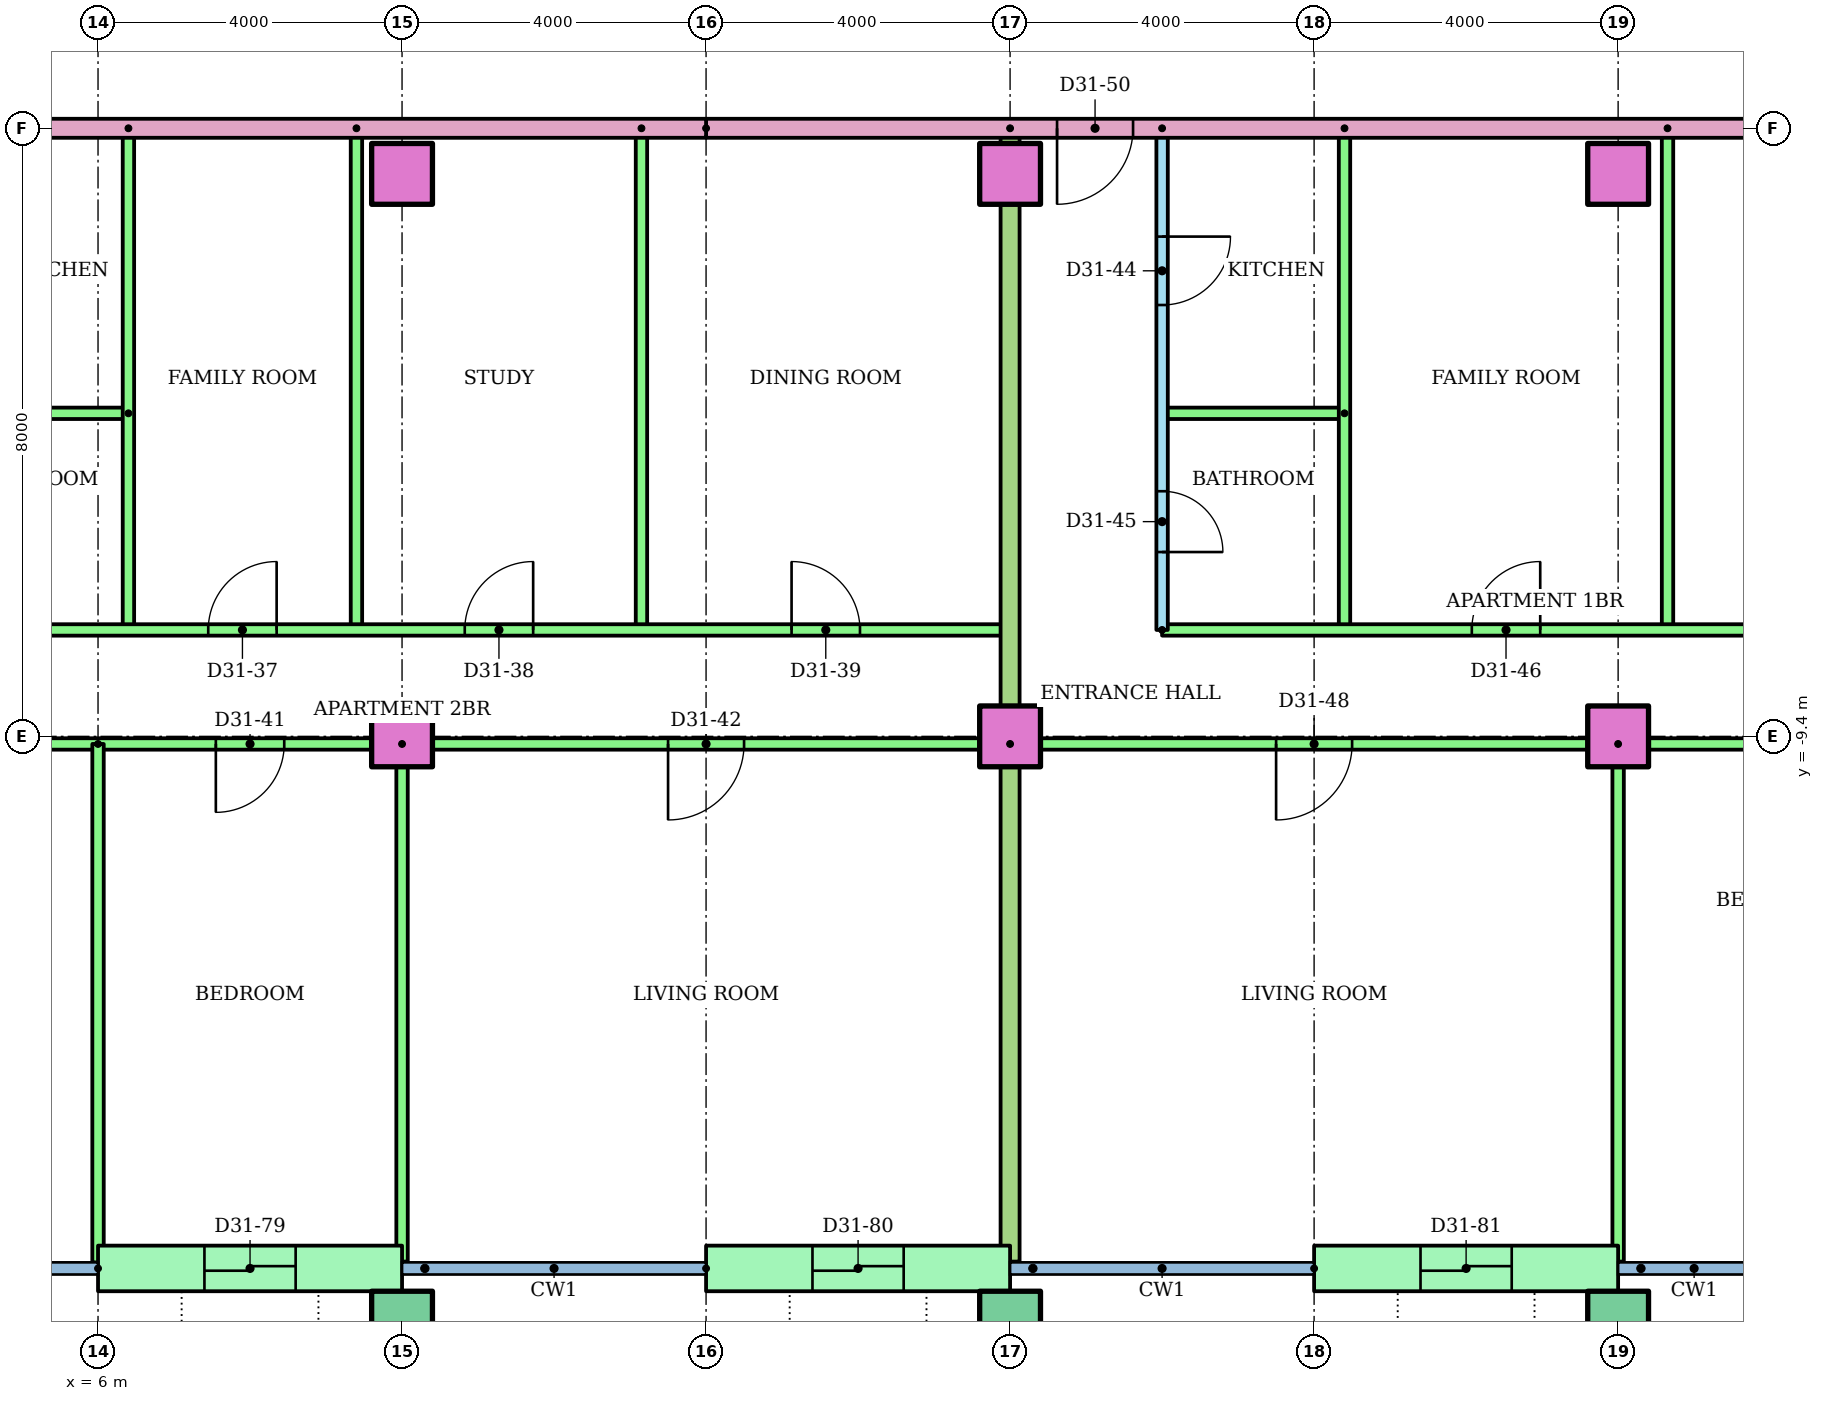
"""IFC4 building model, lengths in metres.
Left out: names, types, materials, properties, quantities, classifications, styles, units other than length and angle.
Written with IfcOpenShell. Run it as: python <this file> out.ifc"""

import sys

from ifc_helpers import new_model, si_unit, direction, frame, frame_2d, origin, origin_2d, place, context, subcontext, project, spatial, rectangle, hollow_rectangle, extrude, element, fill, save


model = new_model("IFC4")
c1 = context("Model", 3, precision=1e-05, world=origin(), true_north=direction((0.0, 1.0)))
c2 = subcontext(c1, "Body", "Model", "MODEL_VIEW")
j1 = project(units=[si_unit("LENGTHUNIT", "METRE"), si_unit("PLANEANGLEUNIT", "RADIAN")], contexts=[c1])
p1 = place(None, origin())
s1 = spatial("IfcSite", under=j1, at=p1, CompositionType="ELEMENT")
p2 = place(p1, origin())
s2 = spatial("IfcBuilding", under=s1, at=p2, CompositionType="ELEMENT")
p3 = place(p2, frame((0.0, 0.0, 123.0)))
s3 = spatial("IfcBuildingStorey", under=s2, at=p3, CompositionType="ELEMENT", Elevation=123.0)
for number, where in (
    (1, (10.0, -17.1, 0.0)),
    (2, (18.0, -17.1, 0.0)),
    (3, (26.0, -17.1, 0.0)),
):
    element("IfcColumn", number, at=place(p3, frame(where)), inside=s3, PredefinedType="COLUMN", context=c2, shape_type="SweptSolid", body=[
        extrude(hollow_rectangle(XDim=0.8, YDim=0.8, WallThickness=0.04, at=origin_2d()), origin(), (0.0, 0.0, 1.0), 3.2),
    ])
for number, where in (
    (4, (10.0, -9.4, 0.0)),
    (5, (18.0, -9.4, 0.0)),
    (6, (26.0, -9.4, 0.0)),
    (7, (10.0, -2.0, 0.0)),
    (8, (18.0, -2.0, 0.0)),
    (9, (26.0, -2.0, 0.0)),
):
    element("IfcColumn", number, at=place(p3, frame(where)), inside=s3, PredefinedType="COLUMN", context=c2, shape_type="SweptSolid", body=[
        extrude(rectangle(XDim=0.8, YDim=0.8, at=origin_2d()), origin(), (0.0, 0.0, 1.0), 3.2),
    ])
p4 = place(p3, frame((6.0, -16.4, 0.0)))
e10 = element("IfcWall", 10, at=p4, inside=s3, PredefinedType="STANDARD", context=c2, shape_type="SweptSolid", body=[
    extrude(rectangle(XDim=4.0, YDim=0.6, at=frame_2d((2.0, 0.0))), origin(), (0.0, 0.0, 1.0), 2.92),
])
p5 = place(p4, frame((1.4, 0.0, 0.0)))
e11 = element("IfcOpeningElement", 11, at=p5, cuts=e10, PredefinedType="OPENING", context=c2, shape_type="SweptSolid", body=[
    extrude(rectangle(XDim=1.2, YDim=2.1, at=frame_2d((0.6, 1.05))), frame((0.0, 0.31, 0.0), z_axis=(0.0, -1.0, 0.0), x_axis=(1.0, 0.0, 0.0)), (0.0, 0.0, 1.0), 0.62),
])
p6 = place(p3, frame((14.0, -16.4, 0.0)))
e12 = element("IfcWall", 12, at=p6, inside=s3, PredefinedType="STANDARD", context=c2, shape_type="SweptSolid", body=[
    extrude(rectangle(XDim=4.0, YDim=0.6, at=frame_2d((2.0, 0.0))), origin(), (0.0, 0.0, 1.0), 2.92),
])
p7 = place(p6, frame((1.4, 0.0, 0.0)))
e13 = element("IfcOpeningElement", 13, at=p7, cuts=e12, PredefinedType="OPENING", context=c2, shape_type="SweptSolid", body=[
    extrude(rectangle(XDim=1.2, YDim=2.1, at=frame_2d((0.6, 1.05))), frame((0.0, 0.31, 0.0), z_axis=(0.0, -1.0, 0.0), x_axis=(1.0, 0.0, 0.0)), (0.0, 0.0, 1.0), 0.62),
])
p8 = place(p3, frame((22.0, -16.4, 0.0)))
e14 = element("IfcWall", 14, at=p8, inside=s3, PredefinedType="STANDARD", context=c2, shape_type="SweptSolid", body=[
    extrude(rectangle(XDim=4.0, YDim=0.6, at=frame_2d((2.0, 0.0))), origin(), (0.0, 0.0, 1.0), 2.92),
])
p9 = place(p8, frame((1.4, 0.0, 0.0)))
e15 = element("IfcOpeningElement", 15, at=p9, cuts=e14, PredefinedType="OPENING", context=c2, shape_type="SweptSolid", body=[
    extrude(rectangle(XDim=1.2, YDim=2.1, at=frame_2d((0.6, 1.05))), frame((0.0, 0.31, 0.0), z_axis=(0.0, -1.0, 0.0), x_axis=(1.0, 0.0, 0.0)), (0.0, 0.0, 1.0), 0.62),
])
p10 = place(p3, frame((6.4, -5.15, 0.0), z_axis=(0.0, 0.0, 1.0), x_axis=(-1.0, 0.0, 0.0)))
e16 = element("IfcWall", 16, at=p10, inside=s3, PredefinedType="PARTITIONING", context=c2, shape_type="SweptSolid", body=[
    extrude(rectangle(XDim=2.4, YDim=0.15, at=frame_2d((1.2, 0.0))), origin(), (0.0, 0.0, 1.0), 2.4),
])
for number, where, z_axis, x_axis in (
    (17, (6.4, -1.4, 0.0), (0.0, 0.0, 1.0), (0.0, -1.0, 0.0)),
    (18, (9.4, -1.4, 0.0), (0.0, 0.0, 1.0), (0.0, -1.0, 0.0)),
    (19, (13.15, -1.4, 0.0), (0.0, 0.0, 1.0), (0.0, -1.0, 0.0)),
):
    element("IfcWall", number, at=place(p3, frame(where, z_axis=z_axis, x_axis=x_axis)), inside=s3, PredefinedType="PARTITIONING", context=c2, shape_type="SweptSolid", body=[
        extrude(rectangle(XDim=6.6, YDim=0.15, at=frame_2d((3.3, 0.0))), origin(), (0.0, 0.0, 1.0), 2.4),
    ])
p11 = place(p3, frame((4.0, -8.0, 0.0)))
e20 = element("IfcWall", 20, at=p11, inside=s3, PredefinedType="PARTITIONING", context=c2, shape_type="SweptSolid", body=[
    extrude(rectangle(XDim=14.0, YDim=0.15, at=frame_2d((7.0, 0.0))), origin(), (0.0, 0.0, 1.0), 2.4),
])
p12 = place(p11, frame((3.45, 0.0, 0.0)))
e21 = element("IfcOpeningElement", 21, at=p12, cuts=e20, PredefinedType="OPENING", context=c2, shape_type="SweptSolid", body=[
    extrude(rectangle(XDim=0.9, YDim=2.1, at=frame_2d((0.45, 1.05))), frame((0.0, 0.085, 0.0), z_axis=(0.0, -1.0, 0.0), x_axis=(1.0, 0.0, 0.0)), (0.0, 0.0, 1.0), 0.17),
])
p13 = place(p11, frame((6.825, 0.0, 0.0)))
e22 = element("IfcOpeningElement", 22, at=p13, cuts=e20, PredefinedType="OPENING", context=c2, shape_type="SweptSolid", body=[
    extrude(rectangle(XDim=0.9, YDim=2.1, at=frame_2d((0.45, 1.05))), frame((0.0, 0.085, 0.0), z_axis=(0.0, -1.0, 0.0), x_axis=(1.0, 0.0, 0.0)), (0.0, 0.0, 1.0), 0.17),
])
p14 = place(p11, frame((11.125, 0.0, 0.0)))
e23 = element("IfcOpeningElement", 23, at=p14, cuts=e20, PredefinedType="OPENING", context=c2, shape_type="SweptSolid", body=[
    extrude(rectangle(XDim=0.9, YDim=2.1, at=frame_2d((0.45, 1.05))), frame((0.0, 0.085, 0.0), z_axis=(0.0, -1.0, 0.0), x_axis=(1.0, 0.0, 0.0)), (0.0, 0.0, 1.0), 0.17),
])
p15 = place(p3, frame((18.0, -9.5, 0.0), z_axis=(0.0, 0.0, 1.0), x_axis=(-1.0, 0.0, 0.0)))
e24 = element("IfcWall", 24, at=p15, inside=s3, PredefinedType="PARTITIONING", context=c2, shape_type="SweptSolid", body=[
    extrude(rectangle(XDim=16.0, YDim=0.15, at=frame_2d((8.0, 0.0))), origin(), (0.0, 0.0, 1.0), 2.4),
])
p16 = place(p15, frame((13.55, 0.0, 0.0)))
e25 = element("IfcOpeningElement", 25, at=p16, cuts=e24, PredefinedType="OPENING", context=c2, shape_type="SweptSolid", body=[
    extrude(rectangle(XDim=0.9, YDim=2.1, at=frame_2d((0.45, 1.05))), frame((0.0, 0.085, 0.0), z_axis=(0.0, -1.0, 0.0), x_axis=(1.0, 0.0, 0.0)), (0.0, 0.0, 1.0), 0.17),
])
p17 = place(p15, frame((9.55, 0.0, 0.0)))
e26 = element("IfcOpeningElement", 26, at=p17, cuts=e24, PredefinedType="OPENING", context=c2, shape_type="SweptSolid", body=[
    extrude(rectangle(XDim=0.9, YDim=2.1, at=frame_2d((0.45, 1.05))), frame((0.0, 0.085, 0.0), z_axis=(0.0, -1.0, 0.0), x_axis=(1.0, 0.0, 0.0)), (0.0, 0.0, 1.0), 0.17),
])
p18 = place(p15, frame((3.5, 0.0, 0.0)))
e27 = element("IfcOpeningElement", 27, at=p18, cuts=e24, PredefinedType="OPENING", context=c2, shape_type="SweptSolid", body=[
    extrude(rectangle(XDim=1.0, YDim=2.1, at=frame_2d((0.5, 1.05))), frame((0.0, 0.085, 0.0), z_axis=(0.0, -1.0, 0.0), x_axis=(1.0, 0.0, 0.0)), (0.0, 0.0, 1.0), 0.17),
])
p19 = place(p3, frame((6.0, -9.5, 0.0), z_axis=(0.0, 0.0, 1.0), x_axis=(0.0, -1.0, 0.0)))
e28 = element("IfcWall", 28, at=p19, inside=s3, PredefinedType="PARTITIONING", context=c2, shape_type="SweptSolid", body=[
    extrude(rectangle(XDim=6.821, YDim=0.15, at=frame_2d((3.411, 0.0))), origin(), (0.0, 0.0, 1.0), 2.4),
])
p20 = place(p3, frame((10.0, -9.5, 0.0), z_axis=(0.0, 0.0, 1.0), x_axis=(0.0, -1.0, 0.0)))
e29 = element("IfcWall", 29, at=p20, inside=s3, PredefinedType="PARTITIONING", context=c2, shape_type="SweptSolid", body=[
    extrude(rectangle(XDim=6.81, YDim=0.15, at=frame_2d((3.405, 0.0))), origin(), (0.0, 0.0, 1.0), 2.4),
])
p21 = place(p3, frame((20.0, -1.4, 0.0), z_axis=(0.0, 0.0, 1.0), x_axis=(0.0, -1.0, 0.0)))
e30 = element("IfcWall", 30, at=p21, inside=s3, PredefinedType="PARTITIONING", context=c2, shape_type="SweptSolid", body=[
    extrude(rectangle(XDim=6.6, YDim=0.15, at=frame_2d((3.3, 0.0))), origin(), (0.0, 0.0, 1.0), 2.4),
])
p22 = place(p21, frame((1.425, 0.0, 0.0)))
e31 = element("IfcOpeningElement", 31, at=p22, cuts=e30, PredefinedType="OPENING", context=c2, shape_type="SweptSolid", body=[
    extrude(rectangle(XDim=0.9, YDim=2.1, at=frame_2d((0.45, 1.05))), frame((0.0, 0.085, 0.0), z_axis=(0.0, -1.0, 0.0), x_axis=(1.0, 0.0, 0.0)), (0.0, 0.0, 1.0), 0.17),
])
p23 = place(p21, frame((4.775, 0.0, 0.0)))
e32 = element("IfcOpeningElement", 32, at=p23, cuts=e30, PredefinedType="OPENING", context=c2, shape_type="SweptSolid", body=[
    extrude(rectangle(XDim=0.8, YDim=2.1, at=frame_2d((0.4, 1.05))), frame((0.0, 0.085, 0.0), z_axis=(0.0, -1.0, 0.0), x_axis=(1.0, 0.0, 0.0)), (0.0, 0.0, 1.0), 0.17),
])
p24 = place(p3, frame((22.4, -5.15, 0.0), z_axis=(0.0, 0.0, 1.0), x_axis=(-1.0, 0.0, 0.0)))
e33 = element("IfcWall", 33, at=p24, inside=s3, PredefinedType="PARTITIONING", context=c2, shape_type="SweptSolid", body=[
    extrude(rectangle(XDim=2.4, YDim=0.15, at=frame_2d((1.2, 0.0))), origin(), (0.0, 0.0, 1.0), 2.4),
])
for number, where, z_axis, x_axis in (
    (34, (22.4, -1.4, 0.0), (0.0, 0.0, 1.0), (0.0, -1.0, 0.0)),
    (35, (26.65, -1.4, 0.0), (0.0, 0.0, 1.0), (0.0, -1.0, 0.0)),
):
    element("IfcWall", number, at=place(p3, frame(where, z_axis=z_axis, x_axis=x_axis)), inside=s3, PredefinedType="PARTITIONING", context=c2, shape_type="SweptSolid", body=[
        extrude(rectangle(XDim=6.6, YDim=0.15, at=frame_2d((3.3, 0.0))), origin(), (0.0, 0.0, 1.0), 2.4),
    ])
p25 = place(p3, frame((20.0, -8.0, 0.0)))
e36 = element("IfcWall", 36, at=p25, inside=s3, PredefinedType="PARTITIONING", context=c2, shape_type="SweptSolid", body=[
    extrude(rectangle(XDim=12.72, YDim=0.15, at=frame_2d((6.36, 0.0))), origin(), (0.0, 0.0, 1.0), 2.4),
])
p26 = place(p25, frame((4.075, 0.0, 0.0)))
e37 = element("IfcOpeningElement", 37, at=p26, cuts=e36, PredefinedType="OPENING", context=c2, shape_type="SweptSolid", body=[
    extrude(rectangle(XDim=0.9, YDim=2.1, at=frame_2d((0.45, 1.05))), frame((0.0, 0.085, 0.0), z_axis=(0.0, -1.0, 0.0), x_axis=(1.0, 0.0, 0.0)), (0.0, 0.0, 1.0), 0.17),
])
p27 = place(p25, frame((9.125, 0.0, 0.0)))
e38 = element("IfcOpeningElement", 38, at=p27, cuts=e36, PredefinedType="OPENING", context=c2, shape_type="SweptSolid", body=[
    extrude(rectangle(XDim=0.9, YDim=2.1, at=frame_2d((0.45, 1.05))), frame((0.0, 0.085, 0.0), z_axis=(0.0, -1.0, 0.0), x_axis=(1.0, 0.0, 0.0)), (0.0, 0.0, 1.0), 0.17),
])
p28 = place(p3, frame((32.72, -9.5, 0.0), z_axis=(0.0, 0.0, 1.0), x_axis=(-1.0, 0.0, 0.0)))
e39 = element("IfcWall", 39, at=p28, inside=s3, PredefinedType="PARTITIONING", context=c2, shape_type="SweptSolid", body=[
    extrude(rectangle(XDim=14.72, YDim=0.15, at=frame_2d((7.36, 0.0))), origin(), (0.0, 0.0, 1.0), 2.4),
])
p29 = place(p28, frame((10.22, 0.0, 0.0)))
e40 = element("IfcOpeningElement", 40, at=p29, cuts=e39, PredefinedType="OPENING", context=c2, shape_type="SweptSolid", body=[
    extrude(rectangle(XDim=1.0, YDim=2.1, at=frame_2d((0.5, 1.05))), frame((0.0, 0.085, 0.0), z_axis=(0.0, -1.0, 0.0), x_axis=(1.0, 0.0, 0.0)), (0.0, 0.0, 1.0), 0.17),
])
p30 = place(p28, frame((3.02, 0.0, 0.0)))
e41 = element("IfcOpeningElement", 41, at=p30, cuts=e39, PredefinedType="OPENING", context=c2, shape_type="SweptSolid", body=[
    extrude(rectangle(XDim=0.9, YDim=2.1, at=frame_2d((0.45, 1.05))), frame((0.0, 0.085, 0.0), z_axis=(0.0, -1.0, 0.0), x_axis=(1.0, 0.0, 0.0)), (0.0, 0.0, 1.0), 0.17),
])
p31 = place(p3, frame((26.0, -9.5, 0.0), z_axis=(0.0, 0.0, 1.0), x_axis=(0.0, -1.0, 0.0)))
e42 = element("IfcWall", 42, at=p31, inside=s3, PredefinedType="PARTITIONING", context=c2, shape_type="SweptSolid", body=[
    extrude(rectangle(XDim=6.81, YDim=0.15, at=frame_2d((3.405, 0.0))), origin(), (0.0, 0.0, 1.0), 2.4),
])
p32 = place(p3, frame((18.0, -1.4, 0.0), z_axis=(0.0, 0.0, 1.0), x_axis=(0.0, -1.0, 0.0)))
e43 = element("IfcWall", 43, at=p32, inside=s3, PredefinedType="PARTITIONING", context=c2, shape_type="SweptSolid", body=[
    extrude(rectangle(XDim=14.91, YDim=0.25, at=frame_2d((7.455, 0.0))), origin(), (0.0, 0.0, 1.0), 2.4),
])
p33 = place(p3, frame((29.0, -1.4, 0.0), z_axis=(0.0, 0.0, 1.0), x_axis=(-1.0, 0.0, 0.0)))
e44 = element("IfcWall", 44, at=p33, inside=s3, PredefinedType="PARTITIONING", context=c2, shape_type="SweptSolid", body=[
    extrude(rectangle(XDim=15.0, YDim=0.25, at=frame_2d((7.5, 0.0))), origin(), (0.0, 0.0, 1.0), 2.4),
])
p34 = place(p33, frame((9.382, 0.0, 0.0)))
e45 = element("IfcOpeningElement", 45, at=p34, cuts=e44, PredefinedType="OPENING", context=c2, shape_type="SweptSolid", body=[
    extrude(rectangle(XDim=1.0, YDim=2.1, at=frame_2d((0.5, 1.05))), frame((0.0, 0.135, 0.0), z_axis=(0.0, -1.0, 0.0), x_axis=(1.0, 0.0, 0.0)), (0.0, 0.0, 1.0), 0.27),
])
p35 = place(p3, frame((14.0, -1.4, 0.0), z_axis=(0.0, 0.0, 1.0), x_axis=(-1.0, 0.0, 0.0)))
e46 = element("IfcWall", 46, at=p35, inside=s3, PredefinedType="PARTITIONING", context=c2, shape_type="SweptSolid", body=[
    extrude(rectangle(XDim=28.0, YDim=0.25, at=frame_2d((14.0, 0.0))), origin(), (0.0, 0.0, 1.0), 2.4),
])
p36 = place(p35, frame((12.618, 0.0, 0.0)))
e47 = element("IfcOpeningElement", 47, at=p36, cuts=e46, PredefinedType="OPENING", context=c2, shape_type="SweptSolid", body=[
    extrude(rectangle(XDim=1.0, YDim=2.1, at=frame_2d((0.5, 1.05))), frame((0.0, 0.135, 0.0), z_axis=(0.0, -1.0, 0.0), x_axis=(1.0, 0.0, 0.0)), (0.0, 0.0, 1.0), 0.27),
])
p37 = place(p35, frame((10.382, 0.0, 0.0)))
e48 = element("IfcOpeningElement", 48, at=p37, cuts=e46, PredefinedType="OPENING", context=c2, shape_type="SweptSolid", body=[
    extrude(rectangle(XDim=1.0, YDim=2.1, at=frame_2d((0.5, 1.05))), frame((0.0, 0.135, 0.0), z_axis=(0.0, -1.0, 0.0), x_axis=(1.0, 0.0, 0.0)), (0.0, 0.0, 1.0), 0.27),
])
p38 = place(p12, origin())
e49 = element("IfcDoor", 49, at=p38, inside=s3, OperationType="SINGLE_SWING_RIGHT", PredefinedType="DOOR", context=c2, shape_type="SweptSolid", body=[
    extrude(rectangle(XDim=0.9, YDim=2.1, at=frame_2d((0.45, 1.05))), frame((0.0, 0.025, 0.0), z_axis=(0.0, -1.0, 0.0), x_axis=(1.0, 0.0, 0.0)), (0.0, 0.0, 1.0), 0.05),
])
fill(e21, e49)
p39 = place(p13, origin())
e50 = element("IfcDoor", 50, at=p39, inside=s3, OperationType="SINGLE_SWING_RIGHT", PredefinedType="DOOR", context=c2, shape_type="SweptSolid", body=[
    extrude(rectangle(XDim=0.9, YDim=2.1, at=frame_2d((0.45, 1.05))), frame((0.0, 0.025, 0.0), z_axis=(0.0, -1.0, 0.0), x_axis=(1.0, 0.0, 0.0)), (0.0, 0.0, 1.0), 0.05),
])
fill(e22, e50)
p40 = place(p14, origin())
e51 = element("IfcDoor", 51, at=p40, inside=s3, OperationType="SINGLE_SWING_LEFT", PredefinedType="DOOR", context=c2, shape_type="SweptSolid", body=[
    extrude(rectangle(XDim=0.9, YDim=2.1, at=frame_2d((0.45, 1.05))), frame((0.0, 0.025, 0.0), z_axis=(0.0, -1.0, 0.0), x_axis=(1.0, 0.0, 0.0)), (0.0, 0.0, 1.0), 0.05),
])
fill(e23, e51)
p41 = place(p17, origin())
e52 = element("IfcDoor", 52, at=p41, inside=s3, OperationType="SINGLE_SWING_RIGHT", PredefinedType="DOOR", context=c2, shape_type="SweptSolid", body=[
    extrude(rectangle(XDim=0.9, YDim=2.1, at=frame_2d((0.45, 1.05))), frame((0.0, 0.025, 0.0), z_axis=(0.0, -1.0, 0.0), x_axis=(1.0, 0.0, 0.0)), (0.0, 0.0, 1.0), 0.05),
])
fill(e26, e52)
p42 = place(p18, origin())
e53 = element("IfcDoor", 53, at=p42, inside=s3, OperationType="SINGLE_SWING_RIGHT", PredefinedType="DOOR", context=c2, shape_type="SweptSolid", body=[
    extrude(rectangle(XDim=1.0, YDim=2.1, at=frame_2d((0.5, 1.05))), frame((0.0, 0.025, 0.0), z_axis=(0.0, -1.0, 0.0), x_axis=(1.0, 0.0, 0.0)), (0.0, 0.0, 1.0), 0.05),
])
fill(e27, e53)
p43 = place(p22, origin())
e54 = element("IfcDoor", 54, at=p43, inside=s3, OperationType="SINGLE_SWING_LEFT", PredefinedType="DOOR", context=c2, shape_type="SweptSolid", body=[
    extrude(rectangle(XDim=0.9, YDim=2.1, at=frame_2d((0.45, 1.05))), frame((0.0, 0.025, 0.0), z_axis=(0.0, -1.0, 0.0), x_axis=(1.0, 0.0, 0.0)), (0.0, 0.0, 1.0), 0.05),
])
fill(e31, e54)
p44 = place(p23, origin())
e55 = element("IfcDoor", 55, at=p44, inside=s3, OperationType="SINGLE_SWING_RIGHT", PredefinedType="DOOR", context=c2, shape_type="SweptSolid", body=[
    extrude(rectangle(XDim=0.8, YDim=2.1, at=frame_2d((0.4, 1.05))), frame((0.0, 0.025, 0.0), z_axis=(0.0, -1.0, 0.0), x_axis=(1.0, 0.0, 0.0)), (0.0, 0.0, 1.0), 0.05),
])
fill(e32, e55)
p45 = place(p26, origin())
e56 = element("IfcDoor", 56, at=p45, inside=s3, OperationType="SINGLE_SWING_RIGHT", PredefinedType="DOOR", context=c2, shape_type="SweptSolid", body=[
    extrude(rectangle(XDim=0.9, YDim=2.1, at=frame_2d((0.45, 1.05))), frame((0.0, 0.025, 0.0), z_axis=(0.0, -1.0, 0.0), x_axis=(1.0, 0.0, 0.0)), (0.0, 0.0, 1.0), 0.05),
])
fill(e37, e56)
p46 = place(p29, origin())
e57 = element("IfcDoor", 57, at=p46, inside=s3, OperationType="SINGLE_SWING_RIGHT", PredefinedType="DOOR", context=c2, shape_type="SweptSolid", body=[
    extrude(rectangle(XDim=1.0, YDim=2.1, at=frame_2d((0.5, 1.05))), frame((0.0, 0.025, 0.0), z_axis=(0.0, -1.0, 0.0), x_axis=(1.0, 0.0, 0.0)), (0.0, 0.0, 1.0), 0.05),
])
fill(e40, e57)
p47 = place(p34, origin())
e58 = element("IfcDoor", 58, at=p47, inside=s3, OperationType="SINGLE_SWING_RIGHT", PredefinedType="DOOR", context=c2, shape_type="SweptSolid", body=[
    extrude(rectangle(XDim=1.0, YDim=2.1, at=frame_2d((0.5, 1.05))), frame((0.0, 0.025, 0.0), z_axis=(0.0, -1.0, 0.0), x_axis=(1.0, 0.0, 0.0)), (0.0, 0.0, 1.0), 0.05),
])
fill(e45, e58)
p48 = place(p5, origin())
e59 = element("IfcDoor", 59, at=p48, inside=s3, OperationType="SLIDING_TO_LEFT", PredefinedType="DOOR", context=c2, shape_type="SweptSolid", body=[
    extrude(rectangle(XDim=1.2, YDim=2.1, at=frame_2d((0.6, 1.05))), frame((0.0, 0.025, 0.0), z_axis=(0.0, -1.0, 0.0), x_axis=(1.0, 0.0, 0.0)), (0.0, 0.0, 1.0), 0.05),
])
fill(e11, e59)
p49 = place(p7, origin())
e60 = element("IfcDoor", 60, at=p49, inside=s3, OperationType="SLIDING_TO_LEFT", PredefinedType="DOOR", context=c2, shape_type="SweptSolid", body=[
    extrude(rectangle(XDim=1.2, YDim=2.1, at=frame_2d((0.6, 1.05))), frame((0.0, 0.025, 0.0), z_axis=(0.0, -1.0, 0.0), x_axis=(1.0, 0.0, 0.0)), (0.0, 0.0, 1.0), 0.05),
])
fill(e13, e60)
p50 = place(p9, origin())
e61 = element("IfcDoor", 61, at=p50, inside=s3, OperationType="SLIDING_TO_LEFT", PredefinedType="DOOR", context=c2, shape_type="SweptSolid", body=[
    extrude(rectangle(XDim=1.2, YDim=2.1, at=frame_2d((0.6, 1.05))), frame((0.0, 0.025, 0.0), z_axis=(0.0, -1.0, 0.0), x_axis=(1.0, 0.0, 0.0)), (0.0, 0.0, 1.0), 0.05),
])
fill(e15, e61)
save(model, sys.argv[1])
